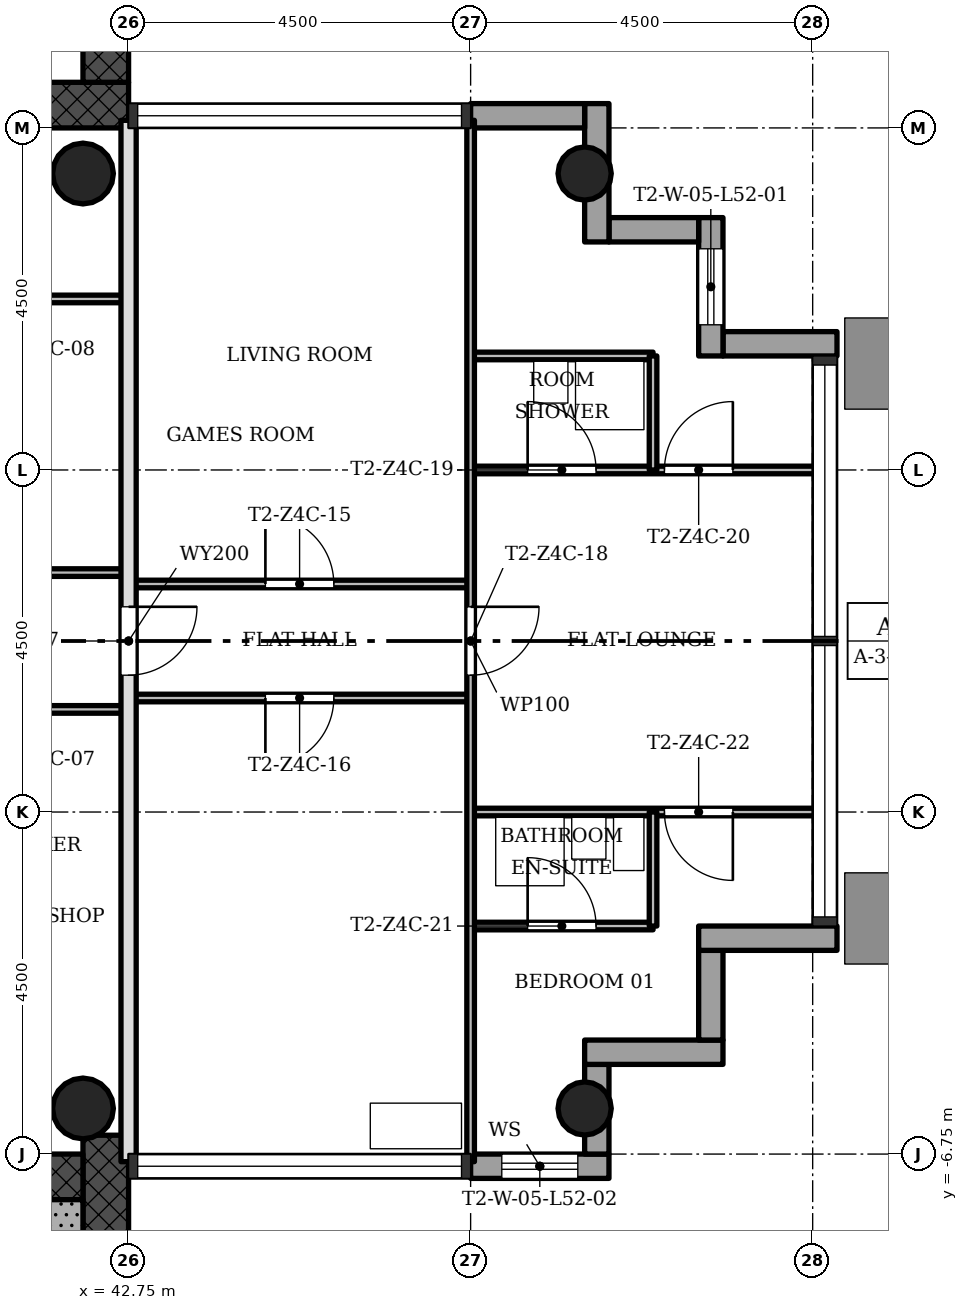
"""IFC4 building model, lengths in metres.
Left out: names, types, materials, properties, quantities, classifications, styles, units other than length and angle.
Written with IfcOpenShell. Run it as: python <this file> out.ifc"""

import sys

from ifc_helpers import new_model, si_unit, direction, frame, frame_2d, origin, origin_2d, place, context, subcontext, project, spatial, rectangle, hollow_circle, extrude, element, fill, save


model = new_model("IFC4")
c1 = context("Model", 3, precision=1e-05, world=origin(), true_north=direction((0.0, 1.0)))
c2 = subcontext(c1, "Body", "Model", "MODEL_VIEW")
j1 = project(units=[si_unit("LENGTHUNIT", "METRE"), si_unit("PLANEANGLEUNIT", "RADIAN")], contexts=[c1])
p1 = place(None, origin())
s1 = spatial("IfcSite", under=j1, at=p1, CompositionType="ELEMENT")
p2 = place(p1, origin())
s2 = spatial("IfcBuilding", under=s1, at=p2, CompositionType="ELEMENT")
p3 = place(p2, frame((0.0, 0.0, 189.2)))
s3 = spatial("IfcBuildingStorey", under=s2, at=p3, CompositionType="ELEMENT", Elevation=189.2)
p4 = place(p3, frame((29.85, 7.05, 0.0), z_axis=(0.0, 0.0, 1.0), x_axis=(1.0, 0.0, 0.0)))
e1 = element("IfcWall", 1, at=p4, inside=s3, PredefinedType="SHEAR", context=c2, shape_type="SweptSolid", body=[
    extrude(rectangle(XDim=12.9, YDim=0.6, at=frame_2d((6.45, 0.0))), origin(), (0.0, 0.0, 1.0), 3.4),
])
p5 = place(p4, frame((5.25, 0.0, 0.0)))
e2 = element("IfcOpeningElement", 2, at=p5, cuts=e1, PredefinedType="OPENING", context=c2, shape_type="SweptSolid", body=[
    extrude(rectangle(XDim=1.8, YDim=2.1, at=frame_2d((0.9, 1.05))), frame((0.0, 0.31, 0.0), z_axis=(0.0, -1.0, 0.0), x_axis=(1.0, 0.0, 0.0)), (0.0, 0.0, 1.0), 0.62),
])
p6 = place(p3, frame((42.45, 7.35, 0.0), z_axis=(0.0, 0.0, 1.0), x_axis=(0.0, 1.0, 0.0)))
e3 = element("IfcWall", 3, at=p6, inside=s3, PredefinedType="SHEAR", context=c2, shape_type="SweptSolid", body=[
    extrude(rectangle(XDim=8.4, YDim=0.6, at=frame_2d((4.2, 0.0))), origin(), (0.0, 0.0, 1.0), 3.4),
])
p7 = place(p3, frame((42.45, -15.15, 0.0), z_axis=(0.0, 0.0, 1.0), x_axis=(0.0, 1.0, 0.0)))
e4 = element("IfcWall", 4, at=p7, inside=s3, PredefinedType="SHEAR", context=c2, shape_type="SweptSolid", body=[
    extrude(rectangle(XDim=8.648, YDim=0.6, at=frame_2d((4.324, 0.0))), origin(), (0.0, 0.0, 1.0), 3.4),
])
p8 = place(p3, frame((42.15, -7.05, 0.0), z_axis=(0.0, 0.0, 1.0), x_axis=(-1.0, 0.0, 0.0)))
e5 = element("IfcWall", 5, at=p8, inside=s3, PredefinedType="SHEAR", context=c2, shape_type="SweptSolid", body=[
    extrude(rectangle(XDim=12.9, YDim=0.6, at=frame_2d((6.45, 0.0))), origin(), (0.0, 0.0, 1.0), 3.4),
])
p9 = place(p8, frame((5.25, 0.0, 0.0)))
e6 = element("IfcOpeningElement", 6, at=p9, cuts=e5, PredefinedType="OPENING", context=c2, shape_type="SweptSolid", body=[
    extrude(rectangle(XDim=1.8, YDim=2.1, at=frame_2d((0.9, 1.05))), frame((0.0, 0.31, 0.0), z_axis=(0.0, -1.0, 0.0), x_axis=(1.0, 0.0, 0.0)), (0.0, 0.0, 1.0), 0.62),
])
for number, where, z_axis, x_axis in (
    (7, (48.75, -6.15, 0.0), (0.0, 0.0, 1.0), (1.0, 0.0, 0.0)),
    (8, (48.75, 6.15, 0.0), (0.0, 0.0, 1.0), (1.0, 0.0, 0.0)),
):
    element("IfcColumn", number, at=place(p3, frame(where, z_axis=z_axis, x_axis=x_axis)), inside=s3, PredefinedType="COLUMN", context=c2, shape_type="SweptSolid", body=[
        extrude(hollow_circle(Radius=0.35, WallThickness=0.025, at=origin_2d()), origin(), (0.0, 0.0, 1.0), 3.4),
    ])
for number, where, z_axis, x_axis in (
    (9, (42.15, -6.15, 0.0), (0.0, 0.0, 1.0), (1.0, 0.0, 0.0)),
    (10, (42.15, 6.15, 0.0), (0.0, 0.0, 1.0), (1.0, 0.0, 0.0)),
):
    element("IfcColumn", number, at=place(p3, frame(where, z_axis=z_axis, x_axis=x_axis)), inside=s3, PredefinedType="COLUMN", context=c2, shape_type="SweptSolid", body=[
        extrude(hollow_circle(Radius=0.4, WallThickness=0.028, at=origin_2d()), origin(), (0.0, 0.0, 1.0), 3.4),
    ])
p10 = place(p3, frame((47.25, -6.91, -0.3), z_axis=(0.0, 0.0, 1.0), x_axis=(1.0, 0.0, 0.0)))
e11 = element("IfcWall", 11, at=p10, inside=s3, PredefinedType="STANDARD", context=c2, shape_type="SweptSolid", body=[
    extrude(rectangle(XDim=1.82, YDim=0.32, at=frame_2d((0.91, 0.0))), origin(), (0.0, 0.0, 1.0), 3.4),
])
p11 = place(p10, frame((0.41, 0.0, 1.2)))
e12 = element("IfcOpeningElement", 12, at=p11, cuts=e11, PredefinedType="OPENING", context=c2, shape_type="SweptSolid", body=[
    extrude(rectangle(XDim=1.0, YDim=1.5, at=frame_2d((0.5, 0.75))), frame((0.0, 0.17, 0.0), z_axis=(0.0, -1.0, 0.0), x_axis=(1.0, 0.0, 0.0)), (0.0, 0.0, 1.0), 0.34),
])
p12 = place(p3, frame((48.91, -6.75, -0.3), z_axis=(0.0, 0.0, 1.0), x_axis=(0.0, 1.0, 0.0)))
e13 = element("IfcWall", 13, at=p12, inside=s3, PredefinedType="STANDARD", context=c2, shape_type="SweptSolid", body=[
    extrude(rectangle(XDim=1.18, YDim=0.32, at=frame_2d((0.59, 0.0))), origin(), (0.0, 0.0, 1.0), 3.4),
])
p13 = place(p3, frame((48.75, -5.41, -0.3), z_axis=(0.0, 0.0, 1.0), x_axis=(1.0, 0.0, 0.0)))
e14 = element("IfcWall", 14, at=p13, inside=s3, PredefinedType="STANDARD", context=c2, shape_type="SweptSolid", body=[
    extrude(rectangle(XDim=1.82, YDim=0.32, at=frame_2d((0.91, 0.0))), origin(), (0.0, 0.0, 1.0), 3.4),
])
p14 = place(p3, frame((50.41, -5.25, -0.3), z_axis=(0.0, 0.0, 1.0), x_axis=(0.0, 1.0, 0.0)))
e15 = element("IfcWall", 15, at=p14, inside=s3, PredefinedType="STANDARD", context=c2, shape_type="SweptSolid", body=[
    extrude(rectangle(XDim=1.18, YDim=0.32, at=frame_2d((0.59, 0.0))), origin(), (0.0, 0.0, 1.0), 3.4),
])
p15 = place(p3, frame((50.25, -3.91, -0.3), z_axis=(0.0, 0.0, 1.0), x_axis=(1.0, 0.0, 0.0)))
e16 = element("IfcWall", 16, at=p15, inside=s3, PredefinedType="STANDARD", context=c2, shape_type="SweptSolid", body=[
    extrude(rectangle(XDim=1.82, YDim=0.32, at=frame_2d((0.91, 0.0))), origin(), (0.0, 0.0, 1.0), 3.4),
])
p16 = place(p3, frame((52.07, 3.91, -0.3), z_axis=(0.0, 0.0, 1.0), x_axis=(-1.0, 0.0, 0.0)))
e17 = element("IfcWall", 17, at=p16, inside=s3, PredefinedType="STANDARD", context=c2, shape_type="SweptSolid", body=[
    extrude(rectangle(XDim=1.5, YDim=0.32, at=frame_2d((0.75, 0.0))), origin(), (0.0, 0.0, 1.0), 3.4),
])
p17 = place(p3, frame((50.41, 3.75, -0.3), z_axis=(0.0, 0.0, 1.0), x_axis=(0.0, 1.0, 0.0)))
e18 = element("IfcWall", 18, at=p17, inside=s3, PredefinedType="STANDARD", context=c2, shape_type="SweptSolid", body=[
    extrude(rectangle(XDim=1.82, YDim=0.32, at=frame_2d((0.91, 0.0))), origin(), (0.0, 0.0, 1.0), 3.4),
])
p18 = place(p17, frame((0.41, 0.0, 1.2)))
e19 = element("IfcOpeningElement", 19, at=p18, cuts=e18, PredefinedType="OPENING", context=c2, shape_type="SweptSolid", body=[
    extrude(rectangle(XDim=1.0, YDim=1.5, at=frame_2d((0.5, 0.75))), frame((0.0, 0.17, 0.0), z_axis=(0.0, -1.0, 0.0), x_axis=(1.0, 0.0, 0.0)), (0.0, 0.0, 1.0), 0.34),
])
p19 = place(p3, frame((50.25, 5.41, -0.3), z_axis=(0.0, 0.0, 1.0), x_axis=(-1.0, 0.0, 0.0)))
e20 = element("IfcWall", 20, at=p19, inside=s3, PredefinedType="STANDARD", context=c2, shape_type="SweptSolid", body=[
    extrude(rectangle(XDim=1.18, YDim=0.32, at=frame_2d((0.59, 0.0))), origin(), (0.0, 0.0, 1.0), 3.4),
])
p20 = place(p3, frame((48.91, 5.25, -0.3), z_axis=(0.0, 0.0, 1.0), x_axis=(0.0, 1.0, 0.0)))
e21 = element("IfcWall", 21, at=p20, inside=s3, PredefinedType="STANDARD", context=c2, shape_type="SweptSolid", body=[
    extrude(rectangle(XDim=1.82, YDim=0.32, at=frame_2d((0.91, 0.0))), origin(), (0.0, 0.0, 1.0), 3.4),
])
p21 = place(p3, frame((48.75, 6.91, -0.3), z_axis=(0.0, 0.0, 1.0), x_axis=(-1.0, 0.0, 0.0)))
e22 = element("IfcWall", 22, at=p21, inside=s3, PredefinedType="STANDARD", context=c2, shape_type="SweptSolid", body=[
    extrude(rectangle(XDim=1.5, YDim=0.32, at=frame_2d((0.75, 0.0))), origin(), (0.0, 0.0, 1.0), 3.4),
])
p22 = place(p3, frame((49.65, -3.75, 0.0), z_axis=(0.0, 0.0, 1.0), x_axis=(-1.0, 0.0, 0.0)))
e23 = element("IfcWall", 23, at=p22, inside=s3, PredefinedType="PARTITIONING", context=c2, shape_type="SweptSolid", body=[
    extrude(rectangle(XDim=2.4, YDim=0.1, at=frame_2d((1.2, 0.0))), origin(), (0.0, 0.0, 1.0), 3.0),
])
p23 = place(p22, frame((0.75, 0.0, 0.0)))
e24 = element("IfcOpeningElement", 24, at=p23, cuts=e23, PredefinedType="OPENING", context=c2, shape_type="SweptSolid", body=[
    extrude(rectangle(XDim=0.9, YDim=2.1, at=frame_2d((0.45, 1.05))), frame((0.0, 0.06, 0.0), z_axis=(0.0, -1.0, 0.0), x_axis=(1.0, 0.0, 0.0)), (0.0, 0.0, 1.0), 0.12),
])
p24 = place(p3, frame((51.85, -2.25, 0.0), z_axis=(0.0, 0.0, 1.0), x_axis=(-1.0, 0.0, 0.0)))
e25 = element("IfcWall", 25, at=p24, inside=s3, PredefinedType="PARTITIONING", context=c2, shape_type="SweptSolid", body=[
    extrude(rectangle(XDim=4.6, YDim=0.1, at=frame_2d((2.3, 0.0))), origin(), (0.0, 0.0, 1.0), 3.0),
])
p25 = place(p24, frame((1.15, 0.0, 0.0)))
e26 = element("IfcOpeningElement", 26, at=p25, cuts=e25, PredefinedType="OPENING", context=c2, shape_type="SweptSolid", body=[
    extrude(rectangle(XDim=0.9, YDim=2.1, at=frame_2d((0.45, 1.05))), frame((0.0, 0.06, 0.0), z_axis=(0.0, -1.0, 0.0), x_axis=(1.0, 0.0, 0.0)), (0.0, 0.0, 1.0), 0.12),
])
p26 = place(p3, frame((42.75, -0.9, 0.0), z_axis=(0.0, 0.0, 1.0), x_axis=(-1.0, 0.0, 0.0)))
e27 = element("IfcWall", 27, at=p26, inside=s3, PredefinedType="PARTITIONING", context=c2, shape_type="SweptSolid", body=[
    extrude(rectangle(XDim=2.25, YDim=0.1, at=frame_2d((1.125, 0.0))), origin(), (0.0, 0.0, 1.0), 3.0),
])
p27 = place(p3, frame((47.25, -0.75, 0.0), z_axis=(0.0, 0.0, 1.0), x_axis=(-1.0, 0.0, 0.0)))
e28 = element("IfcWall", 28, at=p27, inside=s3, PredefinedType="PARTITIONING", context=c2, shape_type="SweptSolid", body=[
    extrude(rectangle(XDim=4.5, YDim=0.1, at=frame_2d((2.25, 0.0))), origin(), (0.0, 0.0, 1.0), 3.0),
])
p28 = place(p27, frame((1.8, 0.0, 0.0)))
e29 = element("IfcOpeningElement", 29, at=p28, cuts=e28, PredefinedType="OPENING", context=c2, shape_type="SweptSolid", body=[
    extrude(rectangle(XDim=0.9, YDim=2.1, at=frame_2d((0.45, 1.05))), frame((0.0, 0.06, 0.0), z_axis=(0.0, -1.0, 0.0), x_axis=(1.0, 0.0, 0.0)), (0.0, 0.0, 1.0), 0.12),
])
p29 = place(p3, frame((47.25, 0.75, 0.0), z_axis=(0.0, 0.0, 1.0), x_axis=(-1.0, 0.0, 0.0)))
e30 = element("IfcWall", 30, at=p29, inside=s3, PredefinedType="PARTITIONING", context=c2, shape_type="SweptSolid", body=[
    extrude(rectangle(XDim=4.5, YDim=0.1, at=frame_2d((2.25, 0.0))), origin(), (0.0, 0.0, 1.0), 3.0),
])
p30 = place(p29, frame((1.8, 0.0, 0.0)))
e31 = element("IfcOpeningElement", 31, at=p30, cuts=e30, PredefinedType="OPENING", context=c2, shape_type="SweptSolid", body=[
    extrude(rectangle(XDim=0.9, YDim=2.1, at=frame_2d((0.45, 1.05))), frame((0.0, 0.06, 0.0), z_axis=(0.0, -1.0, 0.0), x_axis=(1.0, 0.0, 0.0)), (0.0, 0.0, 1.0), 0.12),
])
p31 = place(p3, frame((42.75, 0.9, 0.0), z_axis=(0.0, 0.0, 1.0), x_axis=(-1.0, 0.0, 0.0)))
e32 = element("IfcWall", 32, at=p31, inside=s3, PredefinedType="PARTITIONING", context=c2, shape_type="SweptSolid", body=[
    extrude(rectangle(XDim=2.25, YDim=0.1, at=frame_2d((1.125, 0.0))), origin(), (0.0, 0.0, 1.0), 3.0),
])
p32 = place(p3, frame((51.85, 2.25, 0.0), z_axis=(0.0, 0.0, 1.0), x_axis=(-1.0, 0.0, 0.0)))
e33 = element("IfcWall", 33, at=p32, inside=s3, PredefinedType="PARTITIONING", context=c2, shape_type="SweptSolid", body=[
    extrude(rectangle(XDim=4.6, YDim=0.1, at=frame_2d((2.3, 0.0))), origin(), (0.0, 0.0, 1.0), 3.0),
])
p33 = place(p32, frame((2.95, 0.0, 0.0)))
e34 = element("IfcOpeningElement", 34, at=p33, cuts=e33, PredefinedType="OPENING", context=c2, shape_type="SweptSolid", body=[
    extrude(rectangle(XDim=0.9, YDim=2.1, at=frame_2d((0.45, 1.05))), frame((0.0, 0.06, 0.0), z_axis=(0.0, -1.0, 0.0), x_axis=(1.0, 0.0, 0.0)), (0.0, 0.0, 1.0), 0.12),
])
p34 = place(p32, frame((1.15, 0.0, 0.0)))
e35 = element("IfcOpeningElement", 35, at=p34, cuts=e33, PredefinedType="OPENING", context=c2, shape_type="SweptSolid", body=[
    extrude(rectangle(XDim=0.9, YDim=2.1, at=frame_2d((0.45, 1.05))), frame((0.0, 0.06, 0.0), z_axis=(0.0, -1.0, 0.0), x_axis=(1.0, 0.0, 0.0)), (0.0, 0.0, 1.0), 0.12),
])
p35 = place(p3, frame((49.65, 3.75, 0.0), z_axis=(0.0, 0.0, 1.0), x_axis=(-1.0, 0.0, 0.0)))
e36 = element("IfcWall", 36, at=p35, inside=s3, PredefinedType="PARTITIONING", context=c2, shape_type="SweptSolid", body=[
    extrude(rectangle(XDim=2.4, YDim=0.1, at=frame_2d((1.2, 0.0))), origin(), (0.0, 0.0, 1.0), 3.0),
])
p36 = place(p3, frame((42.75, 4.5, 0.0), z_axis=(0.0, 0.0, 1.0), x_axis=(-1.0, 0.0, 0.0)))
e37 = element("IfcWall", 37, at=p36, inside=s3, PredefinedType="PARTITIONING", context=c2, shape_type="SweptSolid", body=[
    extrude(rectangle(XDim=5.25, YDim=0.1, at=frame_2d((2.625, 0.0))), origin(), (0.0, 0.0, 1.0), 3.0),
])
p37 = place(p36, frame((3.3, 0.0, 0.0)))
e38 = element("IfcOpeningElement", 38, at=p37, cuts=e37, PredefinedType="OPENING", context=c2, shape_type="SweptSolid", body=[
    extrude(rectangle(XDim=0.9, YDim=2.1, at=frame_2d((0.45, 1.05))), frame((0.0, 0.06, 0.0), z_axis=(0.0, -1.0, 0.0), x_axis=(1.0, 0.0, 0.0)), (0.0, 0.0, 1.0), 0.12),
])
for number, where, z_axis, x_axis in (
    (39, (49.65, -3.75, 0.0), (0.0, 0.0, 1.0), (0.0, 1.0, 0.0)),
    (40, (49.65, 2.25, 0.0), (0.0, 0.0, 1.0), (0.0, 1.0, 0.0)),
):
    element("IfcWall", number, at=place(p3, frame(where, z_axis=z_axis, x_axis=x_axis)), inside=s3, PredefinedType="PARTITIONING", context=c2, shape_type="SweptSolid", body=[
        extrude(rectangle(XDim=1.5, YDim=0.1, at=frame_2d((0.75, 0.0))), origin(), (0.0, 0.0, 1.0), 3.0),
    ])
p38 = place(p3, frame((47.25, -6.85, 0.0), z_axis=(0.0, 0.0, 1.0), x_axis=(0.0, 1.0, 0.0)))
e41 = element("IfcWall", 41, at=p38, inside=s3, PredefinedType="PARTITIONING", context=c2, shape_type="SweptSolid", body=[
    extrude(rectangle(XDim=13.7, YDim=0.1, at=frame_2d((6.85, 0.0))), origin(), (0.0, 0.0, 1.0), 3.0),
])
p39 = place(p38, frame((6.4, 0.0, 0.0)))
e42 = element("IfcOpeningElement", 42, at=p39, cuts=e41, PredefinedType="OPENING", context=c2, shape_type="SweptSolid", body=[
    extrude(rectangle(XDim=0.9, YDim=2.1, at=frame_2d((0.45, 1.05))), frame((0.0, 0.06, 0.0), z_axis=(0.0, -1.0, 0.0), x_axis=(1.0, 0.0, 0.0)), (0.0, 0.0, 1.0), 0.12),
])
p40 = place(p3, frame((42.75, -6.85, 0.0), z_axis=(0.0, 0.0, 1.0), x_axis=(0.0, 1.0, 0.0)))
e43 = element("IfcWall", 43, at=p40, inside=s3, PredefinedType="SOLIDWALL", context=c2, shape_type="SweptSolid", body=[
    extrude(rectangle(XDim=13.7, YDim=0.2, at=frame_2d((6.85, 0.0))), origin(), (0.0, 0.0, 1.0), 3.0),
])
p41 = place(p40, frame((6.4, 0.0, 0.0)))
e44 = element("IfcOpeningElement", 44, at=p41, cuts=e43, PredefinedType="OPENING", context=c2, shape_type="SweptSolid", body=[
    extrude(rectangle(XDim=0.9, YDim=2.1, at=frame_2d((0.45, 1.05))), frame((0.0, 0.11, 0.0), z_axis=(0.0, -1.0, 0.0), x_axis=(1.0, 0.0, 0.0)), (0.0, 0.0, 1.0), 0.22),
])
p42 = place(p3, frame((37.85, -7.65, 0.0), z_axis=(0.0, 0.0, 1.0), x_axis=(1.0, 0.0, 0.0)))
e45 = element("IfcWall", 45, at=p42, inside=s3, PredefinedType="SHEAR", context=c2, shape_type="SweptSolid", body=[
    extrude(rectangle(XDim=4.3, YDim=0.6, at=frame_2d((2.15, 0.0))), origin(), (0.0, 0.0, 1.0), 3.4),
])
p43 = place(p30, origin())
e46 = element("IfcDoor", 46, at=p43, inside=s3, OperationType="SINGLE_SWING_RIGHT", PredefinedType="DOOR", context=c2, shape_type="SweptSolid", body=[
    extrude(rectangle(XDim=0.9, YDim=2.1, at=frame_2d((0.45, 1.05))), frame((0.0, 0.025, 0.0), z_axis=(0.0, -1.0, 0.0), x_axis=(1.0, 0.0, 0.0)), (0.0, 0.0, 1.0), 0.05),
])
fill(e31, e46)
p44 = place(p28, origin())
e47 = element("IfcDoor", 47, at=p44, inside=s3, OperationType="SINGLE_SWING_LEFT", PredefinedType="DOOR", context=c2, shape_type="SweptSolid", body=[
    extrude(rectangle(XDim=0.9, YDim=2.1, at=frame_2d((0.45, 1.05))), frame((0.0, 0.025, 0.0), z_axis=(0.0, -1.0, 0.0), x_axis=(1.0, 0.0, 0.0)), (0.0, 0.0, 1.0), 0.05),
])
fill(e29, e47)
p45 = place(p41, origin())
e48 = element("IfcDoor", 48, at=p45, inside=s3, OperationType="SINGLE_SWING_RIGHT", PredefinedType="DOOR", context=c2, shape_type="SweptSolid", body=[
    extrude(rectangle(XDim=0.9, YDim=2.1, at=frame_2d((0.45, 1.05))), frame((0.0, 0.025, 0.0), z_axis=(0.0, -1.0, 0.0), x_axis=(1.0, 0.0, 0.0)), (0.0, 0.0, 1.0), 0.05),
])
fill(e44, e48)
p46 = place(p39, origin())
e49 = element("IfcDoor", 49, at=p46, inside=s3, OperationType="SINGLE_SWING_RIGHT", PredefinedType="DOOR", context=c2, shape_type="SweptSolid", body=[
    extrude(rectangle(XDim=0.9, YDim=2.1, at=frame_2d((0.45, 1.05))), frame((0.0, 0.025, 0.0), z_axis=(0.0, -1.0, 0.0), x_axis=(1.0, 0.0, 0.0)), (0.0, 0.0, 1.0), 0.05),
])
fill(e42, e49)
p47 = place(p33, origin())
e50 = element("IfcDoor", 50, at=p47, inside=s3, OperationType="SINGLE_SWING_RIGHT", PredefinedType="DOOR", context=c2, shape_type="SweptSolid", body=[
    extrude(rectangle(XDim=0.9, YDim=2.1, at=frame_2d((0.45, 1.05))), frame((0.0, 0.025, 0.0), z_axis=(0.0, -1.0, 0.0), x_axis=(1.0, 0.0, 0.0)), (0.0, 0.0, 1.0), 0.05),
])
fill(e34, e50)
p48 = place(p34, origin())
e51 = element("IfcDoor", 51, at=p48, inside=s3, OperationType="SINGLE_SWING_LEFT", PredefinedType="DOOR", context=c2, shape_type="SweptSolid", body=[
    extrude(rectangle(XDim=0.9, YDim=2.1, at=frame_2d((0.45, 1.05))), frame((0.0, 0.025, 0.0), z_axis=(0.0, -1.0, 0.0), x_axis=(1.0, 0.0, 0.0)), (0.0, 0.0, 1.0), 0.05),
])
fill(e35, e51)
p49 = place(p23, origin())
e52 = element("IfcDoor", 52, at=p49, inside=s3, OperationType="SINGLE_SWING_RIGHT", PredefinedType="DOOR", context=c2, shape_type="SweptSolid", body=[
    extrude(rectangle(XDim=0.9, YDim=2.1, at=frame_2d((0.45, 1.05))), frame((0.0, 0.025, 0.0), z_axis=(0.0, -1.0, 0.0), x_axis=(1.0, 0.0, 0.0)), (0.0, 0.0, 1.0), 0.05),
])
fill(e24, e52)
p50 = place(p25, origin())
e53 = element("IfcDoor", 53, at=p50, inside=s3, OperationType="SINGLE_SWING_RIGHT", PredefinedType="DOOR", context=c2, shape_type="SweptSolid", body=[
    extrude(rectangle(XDim=0.9, YDim=2.1, at=frame_2d((0.45, 1.05))), frame((0.0, 0.025, 0.0), z_axis=(0.0, -1.0, 0.0), x_axis=(1.0, 0.0, 0.0)), (0.0, 0.0, 1.0), 0.05),
])
fill(e26, e53)
p51 = place(p18, origin())
e54 = element("IfcWindow", 54, at=p51, inside=s3, PartitioningType="SINGLE_PANEL", PredefinedType="WINDOW", context=c2, shape_type="SweptSolid", body=[
    extrude(rectangle(XDim=1.0, YDim=1.5, at=frame_2d((0.5, 0.75))), frame((0.0, 0.03, 0.0), z_axis=(0.0, -1.0, 0.0), x_axis=(1.0, 0.0, 0.0)), (0.0, 0.0, 1.0), 0.06),
])
fill(e19, e54)
p52 = place(p11, origin())
e55 = element("IfcWindow", 55, at=p52, inside=s3, PartitioningType="SINGLE_PANEL", PredefinedType="WINDOW", context=c2, shape_type="SweptSolid", body=[
    extrude(rectangle(XDim=1.0, YDim=1.5, at=frame_2d((0.5, 0.75))), frame((0.0, 0.03, 0.0), z_axis=(0.0, -1.0, 0.0), x_axis=(1.0, 0.0, 0.0)), (0.0, 0.0, 1.0), 0.06),
])
fill(e12, e55)
save(model, sys.argv[1])
